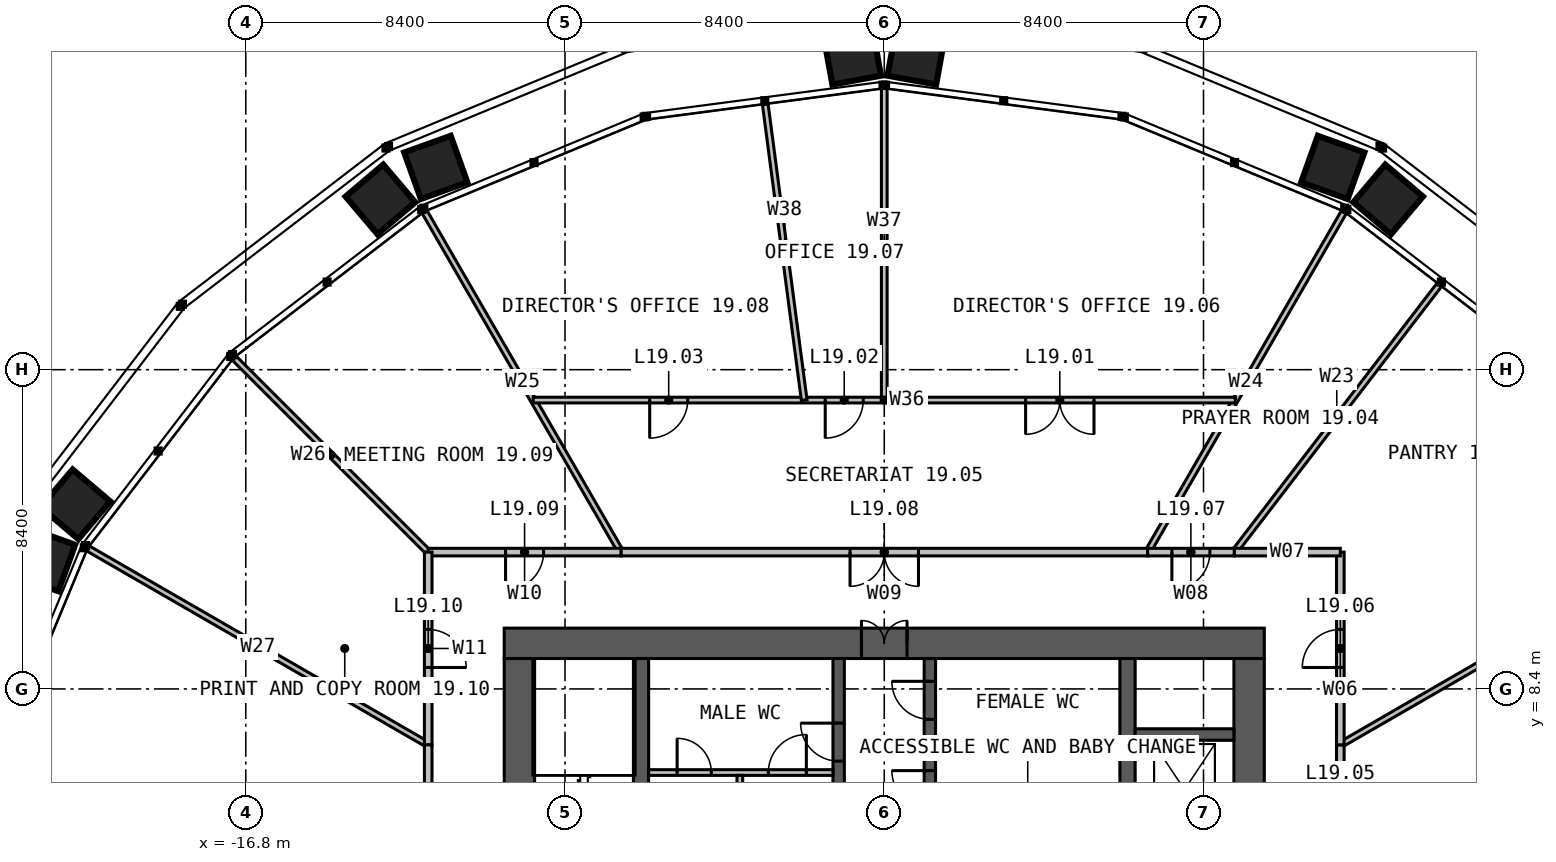
"""IFC4 building model, lengths in metres.
Left out: names, types, materials, properties, quantities, classifications, styles, units other than length and angle.
Written with IfcOpenShell. Run it as: python <this file> out.ifc"""

import sys

from ifc_helpers import new_model, si_unit, direction, frame, frame_2d, origin, place, context, subcontext, project, spatial, rectangle, extrude, element, fill, save


model = new_model("IFC4")
c1 = context("Model", 3, precision=1e-05, world=origin(), true_north=direction((0.0, 1.0)))
c2 = subcontext(c1, "Body", "Model", "MODEL_VIEW")
j1 = project(units=[si_unit("LENGTHUNIT", "METRE"), si_unit("PLANEANGLEUNIT", "RADIAN")], contexts=[c1])
p1 = place(None, origin())
s1 = spatial("IfcSite", under=j1, at=p1, CompositionType="ELEMENT")
p2 = place(p1, origin())
s2 = spatial("IfcBuilding", under=s1, at=p2, CompositionType="ELEMENT")
p3 = place(p2, frame((0.0, 0.0, 81.0)))
s3 = spatial("IfcBuildingStorey", under=s2, at=p3, CompositionType="ELEMENT", Elevation=81.0)
p4 = place(p3, frame((-10.0, 9.6, 0.0), z_axis=(0.0, 0.0, 1.0), x_axis=(1.0, 0.0, 0.0)))
e1 = element("IfcWall", 1, at=p4, inside=s3, PredefinedType="SOLIDWALL", context=c2, shape_type="SweptSolid", body=[
    extrude(rectangle(XDim=20.0, YDim=0.8, at=frame_2d((10.0, 0.0))), origin(), (0.0, 0.0, 1.0), 4.0),
])
p5 = place(p4, frame((9.4, 0.0, 0.0)))
e2 = element("IfcOpeningElement", 2, at=p5, cuts=e1, PredefinedType="OPENING", context=c2, shape_type="SweptSolid", body=[
    extrude(rectangle(XDim=1.2, YDim=2.2, at=frame_2d((0.6, 1.1))), frame((0.0, 0.41, 0.0), z_axis=(0.0, -1.0, 0.0), x_axis=(1.0, 0.0, 0.0)), (0.0, 0.0, 1.0), 0.82),
])
for number, where, z_axis, x_axis in (
    (3, (9.6, -9.2, 0.0), (0.0, 0.0, 1.0), (0.0, 1.0, 0.0)),
    (4, (-9.6, 9.2, 0.0), (0.0, 0.0, 1.0), (0.0, -1.0, 0.0)),
):
    element("IfcWall", number, at=place(p3, frame(where, z_axis=z_axis, x_axis=x_axis)), inside=s3, PredefinedType="SOLIDWALL", context=c2, shape_type="SweptSolid", body=[
        extrude(rectangle(XDim=18.4, YDim=0.8, at=frame_2d((9.2, 0.0))), origin(), (0.0, 0.0, 1.0), 4.0),
    ])
p6 = place(p3, frame((-6.4, -9.2, 0.0), z_axis=(0.0, 0.0, 1.0), x_axis=(0.0, 1.0, 0.0)))
e5 = element("IfcWall", 5, at=p6, inside=s3, PredefinedType="SOLIDWALL", context=c2, shape_type="SweptSolid", body=[
    extrude(rectangle(XDim=18.4, YDim=0.4, at=frame_2d((9.2, 0.0))), origin(), (0.0, 0.0, 1.0), 4.0),
])
p7 = place(p6, frame((8.7, 0.0, 0.0)))
e6 = element("IfcOpeningElement", 6, at=p7, cuts=e5, PredefinedType="OPENING", context=c2, shape_type="SweptSolid", body=[
    extrude(rectangle(XDim=1.0, YDim=2.2, at=frame_2d((0.5, 1.1))), frame((0.0, 0.21, 0.0), z_axis=(0.0, -1.0, 0.0), x_axis=(1.0, 0.0, 0.0)), (0.0, 0.0, 1.0), 0.42),
])
p8 = place(p3, frame((6.4, 9.2, 0.0), z_axis=(0.0, 0.0, 1.0), x_axis=(0.0, -1.0, 0.0)))
e7 = element("IfcWall", 7, at=p8, inside=s3, PredefinedType="SOLIDWALL", context=c2, shape_type="SweptSolid", body=[
    extrude(rectangle(XDim=18.4, YDim=0.4, at=frame_2d((9.2, 0.0))), origin(), (0.0, 0.0, 1.0), 4.0),
])
p9 = place(p8, frame((8.7, 0.0, 0.0)))
e8 = element("IfcOpeningElement", 8, at=p9, cuts=e7, PredefinedType="OPENING", context=c2, shape_type="SweptSolid", body=[
    extrude(rectangle(XDim=1.0, YDim=2.2, at=frame_2d((0.5, 1.1))), frame((0.0, 0.21, 0.0), z_axis=(0.0, -1.0, 0.0), x_axis=(1.0, 0.0, 0.0)), (0.0, 0.0, 1.0), 0.42),
])
p10 = place(p3, frame((-1.2, 1.45, 0.0), z_axis=(0.0, 0.0, 1.0), x_axis=(0.0, 1.0, 0.0)))
e9 = element("IfcWall", 9, at=p10, inside=s3, PredefinedType="SOLIDWALL", context=c2, shape_type="SweptSolid", body=[
    extrude(rectangle(XDim=7.75, YDim=0.3, at=frame_2d((3.875, 0.0))), origin(), (0.0, 0.0, 1.0), 4.0),
])
p11 = place(p10, frame((5.05, 0.0, 0.0)))
e10 = element("IfcOpeningElement", 10, at=p11, cuts=e9, PredefinedType="OPENING", context=c2, shape_type="SweptSolid", body=[
    extrude(rectangle(XDim=1.0, YDim=2.2, at=frame_2d((0.5, 1.1))), frame((0.0, 0.16, 0.0), z_axis=(0.0, -1.0, 0.0), x_axis=(1.0, 0.0, 0.0)), (0.0, 0.0, 1.0), 0.32),
])
p12 = place(p3, frame((1.2, 1.45, 0.0), z_axis=(0.0, 0.0, 1.0), x_axis=(0.0, 1.0, 0.0)))
e11 = element("IfcWall", 11, at=p12, inside=s3, PredefinedType="SOLIDWALL", context=c2, shape_type="SweptSolid", body=[
    extrude(rectangle(XDim=7.75, YDim=0.3, at=frame_2d((3.875, 0.0))), origin(), (0.0, 0.0, 1.0), 4.0),
])
p13 = place(p12, frame((3.8, 0.0, 0.0)))
e12 = element("IfcOpeningElement", 12, at=p13, cuts=e11, PredefinedType="OPENING", context=c2, shape_type="SweptSolid", body=[
    extrude(rectangle(XDim=1.0, YDim=2.2, at=frame_2d((0.5, 1.1))), frame((0.0, 0.16, 0.0), z_axis=(0.0, -1.0, 0.0), x_axis=(1.0, 0.0, 0.0)), (0.0, 0.0, 1.0), 0.32),
])
p14 = place(p12, frame((6.15, 0.0, 0.0)))
e13 = element("IfcOpeningElement", 13, at=p14, cuts=e11, PredefinedType="OPENING", context=c2, shape_type="SweptSolid", body=[
    extrude(rectangle(XDim=1.0, YDim=2.2, at=frame_2d((0.5, 1.1))), frame((0.0, 0.16, 0.0), z_axis=(0.0, -1.0, 0.0), x_axis=(1.0, 0.0, 0.0)), (0.0, 0.0, 1.0), 0.32),
])
p15 = place(p3, frame((6.6, 7.2, 0.0), z_axis=(0.0, 0.0, 1.0), x_axis=(1.0, 0.0, 0.0)))
e14 = element("IfcWall", 14, at=p15, inside=s3, PredefinedType="SOLIDWALL", context=c2, shape_type="SweptSolid", body=[
    extrude(rectangle(XDim=2.6, YDim=0.3, at=frame_2d((1.3, 0.0))), origin(), (0.0, 0.0, 1.0), 4.0),
])
p16 = place(p3, frame((1.35, 6.8, 0.0), z_axis=(0.0, 0.0, 1.0), x_axis=(1.0, 0.0, 0.0)))
e15 = element("IfcWall", 15, at=p16, inside=s3, PredefinedType="PARTITIONING", context=c2, shape_type="SweptSolid", body=[
    extrude(rectangle(XDim=4.85, YDim=0.15, at=frame_2d((2.425, 0.0))), origin(), (0.0, 0.0, 1.0), 3.75),
])
p17 = place(p3, frame((-6.2, 6.2, 0.0), z_axis=(0.0, 0.0, 1.0), x_axis=(1.0, 0.0, 0.0)))
e16 = element("IfcWall", 16, at=p17, inside=s3, PredefinedType="PARTITIONING", context=c2, shape_type="SweptSolid", body=[
    extrude(rectangle(XDim=4.85, YDim=0.15, at=frame_2d((2.425, 0.0))), origin(), (0.0, 0.0, 1.0), 3.75),
])
p18 = place(p17, frame((3.15, 0.0, 0.0)))
e17 = element("IfcOpeningElement", 17, at=p18, cuts=e16, PredefinedType="OPENING", context=c2, shape_type="SweptSolid", body=[
    extrude(rectangle(XDim=1.0, YDim=2.2, at=frame_2d((0.5, 1.1))), frame((0.0, 0.085, 0.0), z_axis=(0.0, -1.0, 0.0), x_axis=(1.0, 0.0, 0.0)), (0.0, 0.0, 1.0), 0.17),
])
p19 = place(p17, frame((0.75, 0.0, 0.0)))
e18 = element("IfcOpeningElement", 18, at=p19, cuts=e16, PredefinedType="OPENING", context=c2, shape_type="SweptSolid", body=[
    extrude(rectangle(XDim=0.9, YDim=2.2, at=frame_2d((0.45, 1.1))), frame((0.0, 0.085, 0.0), z_axis=(0.0, -1.0, 0.0), x_axis=(1.0, 0.0, 0.0)), (0.0, 0.0, 1.0), 0.17),
])
p20 = place(p3, frame((-3.8, 4.75, 0.0), z_axis=(0.0, 0.0, 1.0), x_axis=(0.0, 1.0, 0.0)))
e19 = element("IfcWall", 19, at=p20, inside=s3, PredefinedType="PARTITIONING", context=c2, shape_type="SweptSolid", body=[
    extrude(rectangle(XDim=1.375, YDim=0.15, at=frame_2d((0.688, 0.0))), origin(), (0.0, 0.0, 1.0), 3.75),
])
p21 = place(p3, frame((12.0, 3.215, 0.0), z_axis=(0.0, 0.0, 1.0), x_axis=(0.965925934223, 0.258818642288, 0.0)))
e20 = element("IfcWall", 20, at=p21, inside=s3, PredefinedType="PARTITIONING", context=c2, shape_type="SweptSolid", body=[
    extrude(rectangle(XDim=11.776, YDim=0.15, at=frame_2d((5.888, 0.0))), origin(), (0.0, 0.0, 1.0), 2.79),
])
p22 = place(p3, frame((12.0, 6.928, 0.0), z_axis=(0.0, 0.0, 1.0), x_axis=(0.866023632182, 0.500003068493, 0.0)))
e21 = element("IfcWall", 21, at=p22, inside=s3, PredefinedType="PARTITIONING", context=c2, shape_type="SweptSolid", body=[
    extrude(rectangle(XDim=10.343, YDim=0.15, at=frame_2d((5.171, 0.0))), origin(), (0.0, 0.0, 1.0), 2.79),
])
p23 = place(p3, frame((9.208, 12.0, 0.0), z_axis=(0.0, 0.0, 1.0), x_axis=(0.608757526406, 0.793356334848, 0.0)))
e22 = element("IfcWall", 22, at=p23, inside=s3, PredefinedType="PARTITIONING", context=c2, shape_type="SweptSolid", body=[
    extrude(rectangle(XDim=8.866, YDim=0.15, at=frame_2d((4.433, 0.0))), origin(), (0.0, 0.0, 1.0), 2.79),
])
for number, where, z_axis, x_axis in (
    (23, (6.928, 12.0, 0.0), (0.0, 0.0, 1.0), (0.5, 0.866, 0.0)),
    (24, (-6.928, 12.0, 0.0), (0.0, 0.0, 1.0), (-0.5, 0.866, 0.0)),
):
    element("IfcWall", number, at=place(p3, frame(where, z_axis=z_axis, x_axis=x_axis)), inside=s3, PredefinedType="PARTITIONING", context=c2, shape_type="SweptSolid", body=[
        extrude(rectangle(XDim=10.343, YDim=0.15, at=frame_2d((5.171, 0.0))), origin(), (0.0, 0.0, 1.0), 2.79),
    ])
p24 = place(p3, frame((-12.0, 12.0, 0.0), z_axis=(0.0, 0.0, 1.0), x_axis=(-0.707106781187, 0.707106781187, 0.0)))
e25 = element("IfcWall", 25, at=p24, inside=s3, PredefinedType="PARTITIONING", context=c2, shape_type="SweptSolid", body=[
    extrude(rectangle(XDim=7.229, YDim=0.15, at=frame_2d((3.614, 0.0))), origin(), (0.0, 0.0, 1.0), 2.79),
])
p25 = place(p3, frame((-12.0, 6.928, 0.0), z_axis=(0.0, 0.0, 1.0), x_axis=(-0.866023632182, 0.500003068493, 0.0)))
e26 = element("IfcWall", 26, at=p25, inside=s3, PredefinedType="PARTITIONING", context=c2, shape_type="SweptSolid", body=[
    extrude(rectangle(XDim=10.343, YDim=0.15, at=frame_2d((5.171, 0.0))), origin(), (0.0, 0.0, 1.0), 2.79),
])
p26 = place(p3, frame((12.0, 3.215, 0.0), z_axis=(0.0, 0.0, 1.0), x_axis=(0.0, 1.0, 0.0)))
e27 = element("IfcWall", 27, at=p26, inside=s3, PredefinedType="PARTITIONING", context=c2, shape_type="SweptSolid", body=[
    extrude(rectangle(XDim=3.713, YDim=0.2, at=frame_2d((1.856, 0.0))), origin(), (0.0, 0.0, 1.0), 3.8),
])
p27 = place(p26, frame((1.356, 0.0, 0.0)))
e28 = element("IfcOpeningElement", 28, at=p27, cuts=e27, PredefinedType="OPENING", context=c2, shape_type="SweptSolid", body=[
    extrude(rectangle(XDim=1.0, YDim=2.2, at=frame_2d((0.5, 1.1))), frame((0.0, 0.11, 0.0), z_axis=(0.0, -1.0, 0.0), x_axis=(1.0, 0.0, 0.0)), (0.0, 0.0, 1.0), 0.22),
])
p28 = place(p3, frame((12.0, 6.928, 0.0), z_axis=(0.0, 0.0, 1.0), x_axis=(0.0, 1.0, 0.0)))
e29 = element("IfcWall", 29, at=p28, inside=s3, PredefinedType="PARTITIONING", context=c2, shape_type="SweptSolid", body=[
    extrude(rectangle(XDim=5.072, YDim=0.2, at=frame_2d((2.536, 0.0))), origin(), (0.0, 0.0, 1.0), 3.8),
])
p29 = place(p28, frame((2.036, 0.0, 0.0)))
e30 = element("IfcOpeningElement", 30, at=p29, cuts=e29, PredefinedType="OPENING", context=c2, shape_type="SweptSolid", body=[
    extrude(rectangle(XDim=1.0, YDim=2.2, at=frame_2d((0.5, 1.1))), frame((0.0, 0.11, 0.0), z_axis=(0.0, -1.0, 0.0), x_axis=(1.0, 0.0, 0.0)), (0.0, 0.0, 1.0), 0.22),
])
p30 = place(p3, frame((12.0, 12.0, 0.0), z_axis=(0.0, 0.0, 1.0), x_axis=(-1.0, 0.0, 0.0)))
e31 = element("IfcWall", 31, at=p30, inside=s3, PredefinedType="PARTITIONING", context=c2, shape_type="SweptSolid", body=[
    extrude(rectangle(XDim=2.792, YDim=0.2, at=frame_2d((1.396, 0.0))), origin(), (0.0, 0.0, 1.0), 3.8),
])
p31 = place(p3, frame((9.208, 12.0, 0.0), z_axis=(0.0, 0.0, 1.0), x_axis=(-1.0, 0.0, 0.0)))
e32 = element("IfcWall", 32, at=p31, inside=s3, PredefinedType="PARTITIONING", context=c2, shape_type="SweptSolid", body=[
    extrude(rectangle(XDim=2.28, YDim=0.2, at=frame_2d((1.14, 0.0))), origin(), (0.0, 0.0, 1.0), 3.8),
])
p32 = place(p31, frame((0.64, 0.0, 0.0)))
e33 = element("IfcOpeningElement", 33, at=p32, cuts=e32, PredefinedType="OPENING", context=c2, shape_type="SweptSolid", body=[
    extrude(rectangle(XDim=1.0, YDim=2.2, at=frame_2d((0.5, 1.1))), frame((0.0, 0.11, 0.0), z_axis=(0.0, -1.0, 0.0), x_axis=(1.0, 0.0, 0.0)), (0.0, 0.0, 1.0), 0.22),
])
p33 = place(p3, frame((9.238, 16.0, 0.0), z_axis=(0.0, 0.0, 1.0), x_axis=(-1.0, 0.0, 0.0)))
e34 = element("IfcWall", 34, at=p33, inside=s3, PredefinedType="PARTITIONING", context=c2, shape_type="SweptSolid", body=[
    extrude(rectangle(XDim=18.475, YDim=0.15, at=frame_2d((9.238, 0.0))), origin(), (0.0, 0.0, 1.0), 2.79),
])
p34 = place(p33, frame((3.719, 0.0, 0.0)))
e35 = element("IfcOpeningElement", 35, at=p34, cuts=e34, PredefinedType="OPENING", context=c2, shape_type="SweptSolid", body=[
    extrude(rectangle(XDim=1.8, YDim=2.2, at=frame_2d((0.9, 1.1))), frame((0.0, 0.085, 0.0), z_axis=(0.0, -1.0, 0.0), x_axis=(1.0, 0.0, 0.0)), (0.0, 0.0, 1.0), 0.17),
])
p35 = place(p33, frame((9.791, 0.0, 0.0)))
e36 = element("IfcOpeningElement", 36, at=p35, cuts=e34, PredefinedType="OPENING", context=c2, shape_type="SweptSolid", body=[
    extrude(rectangle(XDim=1.0, YDim=2.2, at=frame_2d((0.5, 1.1))), frame((0.0, 0.085, 0.0), z_axis=(0.0, -1.0, 0.0), x_axis=(1.0, 0.0, 0.0)), (0.0, 0.0, 1.0), 0.17),
])
p36 = place(p33, frame((14.41, 0.0, 0.0)))
e37 = element("IfcOpeningElement", 37, at=p36, cuts=e34, PredefinedType="OPENING", context=c2, shape_type="SweptSolid", body=[
    extrude(rectangle(XDim=1.0, YDim=2.2, at=frame_2d((0.5, 1.1))), frame((0.0, 0.085, 0.0), z_axis=(0.0, -1.0, 0.0), x_axis=(1.0, 0.0, 0.0)), (0.0, 0.0, 1.0), 0.17),
])
p37 = place(p3, frame((0.0, 16.0, 0.0), z_axis=(0.0, 0.0, 1.0), x_axis=(0.0, 1.0, 0.0)))
e38 = element("IfcWall", 38, at=p37, inside=s3, PredefinedType="PARTITIONING", context=c2, shape_type="SweptSolid", body=[
    extrude(rectangle(XDim=8.199, YDim=0.15, at=frame_2d((4.1, 0.0))), origin(), (0.0, 0.0, 1.0), 2.79),
])
p38 = place(p3, frame((-2.106, 16.0, 0.0), z_axis=(0.0, 0.0, 1.0), x_axis=(-0.130524468592, 0.991445088292, 0.0)))
e39 = element("IfcWall", 39, at=p38, inside=s3, PredefinedType="PARTITIONING", context=c2, shape_type="SweptSolid", body=[
    extrude(rectangle(XDim=7.854, YDim=0.15, at=frame_2d((3.927, 0.0))), origin(), (0.0, 0.0, 1.0), 2.79),
])
p39 = place(p3, frame((6.928, 12.0, 0.0), z_axis=(0.0, 0.0, 1.0), x_axis=(-1.0, 0.0, 0.0)))
e40 = element("IfcWall", 40, at=p39, inside=s3, PredefinedType="PARTITIONING", context=c2, shape_type="SweptSolid", body=[
    extrude(rectangle(XDim=13.856, YDim=0.2, at=frame_2d((6.928, 0.0))), origin(), (0.0, 0.0, 1.0), 3.8),
])
p40 = place(p39, frame((6.028, 0.0, 0.0)))
e41 = element("IfcOpeningElement", 41, at=p40, cuts=e40, PredefinedType="OPENING", context=c2, shape_type="SweptSolid", body=[
    extrude(rectangle(XDim=1.8, YDim=2.2, at=frame_2d((0.9, 1.1))), frame((0.0, 0.11, 0.0), z_axis=(0.0, -1.0, 0.0), x_axis=(1.0, 0.0, 0.0)), (0.0, 0.0, 1.0), 0.22),
])
p41 = place(p3, frame((-6.928, 12.0, 0.0), z_axis=(0.0, 0.0, 1.0), x_axis=(-1.0, 0.0, 0.0)))
e42 = element("IfcWall", 42, at=p41, inside=s3, PredefinedType="PARTITIONING", context=c2, shape_type="SweptSolid", body=[
    extrude(rectangle(XDim=5.072, YDim=0.2, at=frame_2d((2.536, 0.0))), origin(), (0.0, 0.0, 1.0), 3.8),
])
p42 = place(p41, frame((2.036, 0.0, 0.0)))
e43 = element("IfcOpeningElement", 43, at=p42, cuts=e42, PredefinedType="OPENING", context=c2, shape_type="SweptSolid", body=[
    extrude(rectangle(XDim=1.0, YDim=2.2, at=frame_2d((0.5, 1.1))), frame((0.0, 0.11, 0.0), z_axis=(0.0, -1.0, 0.0), x_axis=(1.0, 0.0, 0.0)), (0.0, 0.0, 1.0), 0.22),
])
p43 = place(p3, frame((-12.0, 12.0, 0.0), z_axis=(0.0, 0.0, 1.0), x_axis=(0.0, -1.0, 0.0)))
e44 = element("IfcWall", 44, at=p43, inside=s3, PredefinedType="PARTITIONING", context=c2, shape_type="SweptSolid", body=[
    extrude(rectangle(XDim=5.072, YDim=0.2, at=frame_2d((2.536, 0.0))), origin(), (0.0, 0.0, 1.0), 3.8),
])
p44 = place(p43, frame((2.036, 0.0, 0.0)))
e45 = element("IfcOpeningElement", 45, at=p44, cuts=e44, PredefinedType="OPENING", context=c2, shape_type="SweptSolid", body=[
    extrude(rectangle(XDim=1.0, YDim=2.2, at=frame_2d((0.5, 1.1))), frame((0.0, 0.11, 0.0), z_axis=(0.0, -1.0, 0.0), x_axis=(1.0, 0.0, 0.0)), (0.0, 0.0, 1.0), 0.22),
])
p45 = place(p3, frame((-12.0, 6.928, 0.0), z_axis=(0.0, 0.0, 1.0), x_axis=(0.0, -1.0, 0.0)))
e46 = element("IfcWall", 46, at=p45, inside=s3, PredefinedType="PARTITIONING", context=c2, shape_type="SweptSolid", body=[
    extrude(rectangle(XDim=8.508, YDim=0.2, at=frame_2d((4.254, 0.0))), origin(), (0.0, 0.0, 1.0), 3.8),
])
p46 = place(p45, frame((3.354, 0.0, 0.0)))
e47 = element("IfcOpeningElement", 47, at=p46, cuts=e46, PredefinedType="OPENING", context=c2, shape_type="SweptSolid", body=[
    extrude(rectangle(XDim=1.8, YDim=2.2, at=frame_2d((0.9, 1.1))), frame((0.0, 0.11, 0.0), z_axis=(0.0, -1.0, 0.0), x_axis=(1.0, 0.0, 0.0)), (0.0, 0.0, 1.0), 0.22),
])
p47 = place(p5, origin())
e48 = element("IfcDoor", 48, at=p47, inside=s3, OperationType="DOUBLE_DOOR_SINGLE_SWING", PredefinedType="DOOR", context=c2, shape_type="SweptSolid", body=[
    extrude(rectangle(XDim=1.2, YDim=2.2, at=frame_2d((0.6, 1.1))), frame((0.0, 0.025, 0.0), z_axis=(0.0, -1.0, 0.0), x_axis=(1.0, 0.0, 0.0)), (0.0, 0.0, 1.0), 0.05),
])
fill(e2, e48)
p48 = place(p11, origin())
e49 = element("IfcDoor", 49, at=p48, inside=s3, OperationType="SINGLE_SWING_RIGHT", PredefinedType="DOOR", context=c2, shape_type="SweptSolid", body=[
    extrude(rectangle(XDim=1.0, YDim=2.2, at=frame_2d((0.5, 1.1))), frame((0.0, 0.025, 0.0), z_axis=(0.0, -1.0, 0.0), x_axis=(1.0, 0.0, 0.0)), (0.0, 0.0, 1.0), 0.05),
])
fill(e10, e49)
p49 = place(p13, origin())
e50 = element("IfcDoor", 50, at=p49, inside=s3, OperationType="SINGLE_SWING_RIGHT", PredefinedType="DOOR", context=c2, shape_type="SweptSolid", body=[
    extrude(rectangle(XDim=1.0, YDim=2.2, at=frame_2d((0.5, 1.1))), frame((0.0, 0.025, 0.0), z_axis=(0.0, -1.0, 0.0), x_axis=(1.0, 0.0, 0.0)), (0.0, 0.0, 1.0), 0.05),
])
fill(e12, e50)
p50 = place(p14, origin())
e51 = element("IfcDoor", 51, at=p50, inside=s3, OperationType="SINGLE_SWING_RIGHT", PredefinedType="DOOR", context=c2, shape_type="SweptSolid", body=[
    extrude(rectangle(XDim=1.0, YDim=2.2, at=frame_2d((0.5, 1.1))), frame((0.0, 0.025, 0.0), z_axis=(0.0, -1.0, 0.0), x_axis=(1.0, 0.0, 0.0)), (0.0, 0.0, 1.0), 0.05),
])
fill(e13, e51)
p51 = place(p18, origin())
e52 = element("IfcDoor", 52, at=p51, inside=s3, OperationType="SINGLE_SWING_RIGHT", PredefinedType="DOOR", context=c2, shape_type="SweptSolid", body=[
    extrude(rectangle(XDim=1.0, YDim=2.2, at=frame_2d((0.5, 1.1))), frame((0.0, 0.025, 0.0), z_axis=(0.0, -1.0, 0.0), x_axis=(1.0, 0.0, 0.0)), (0.0, 0.0, 1.0), 0.05),
])
fill(e17, e52)
p52 = place(p19, origin())
e53 = element("IfcDoor", 53, at=p52, inside=s3, OperationType="SINGLE_SWING_LEFT", PredefinedType="DOOR", context=c2, shape_type="SweptSolid", body=[
    extrude(rectangle(XDim=0.9, YDim=2.2, at=frame_2d((0.45, 1.1))), frame((0.0, 0.025, 0.0), z_axis=(0.0, -1.0, 0.0), x_axis=(1.0, 0.0, 0.0)), (0.0, 0.0, 1.0), 0.05),
])
fill(e18, e53)
p53 = place(p29, origin())
e54 = element("IfcDoor", 54, at=p53, inside=s3, OperationType="SINGLE_SWING_LEFT", PredefinedType="DOOR", context=c2, shape_type="SweptSolid", body=[
    extrude(rectangle(XDim=1.0, YDim=2.2, at=frame_2d((0.5, 1.1))), frame((0.0, 0.025, 0.0), z_axis=(0.0, -1.0, 0.0), x_axis=(1.0, 0.0, 0.0)), (0.0, 0.0, 1.0), 0.05),
])
fill(e30, e54)
p54 = place(p32, origin())
e55 = element("IfcDoor", 55, at=p54, inside=s3, OperationType="SINGLE_SWING_RIGHT", PredefinedType="DOOR", context=c2, shape_type="SweptSolid", body=[
    extrude(rectangle(XDim=1.0, YDim=2.2, at=frame_2d((0.5, 1.1))), frame((0.0, 0.025, 0.0), z_axis=(0.0, -1.0, 0.0), x_axis=(1.0, 0.0, 0.0)), (0.0, 0.0, 1.0), 0.05),
])
fill(e33, e55)
p55 = place(p34, origin())
e56 = element("IfcDoor", 56, at=p55, inside=s3, OperationType="DOUBLE_DOOR_SINGLE_SWING", PredefinedType="DOOR", context=c2, shape_type="SweptSolid", body=[
    extrude(rectangle(XDim=1.8, YDim=2.2, at=frame_2d((0.9, 1.1))), frame((0.0, 0.025, 0.0), z_axis=(0.0, -1.0, 0.0), x_axis=(1.0, 0.0, 0.0)), (0.0, 0.0, 1.0), 0.05),
])
fill(e35, e56)
p56 = place(p35, origin())
e57 = element("IfcDoor", 57, at=p56, inside=s3, OperationType="SINGLE_SWING_RIGHT", PredefinedType="DOOR", context=c2, shape_type="SweptSolid", body=[
    extrude(rectangle(XDim=1.0, YDim=2.2, at=frame_2d((0.5, 1.1))), frame((0.0, 0.025, 0.0), z_axis=(0.0, -1.0, 0.0), x_axis=(1.0, 0.0, 0.0)), (0.0, 0.0, 1.0), 0.05),
])
fill(e36, e57)
p57 = place(p36, origin())
e58 = element("IfcDoor", 58, at=p57, inside=s3, OperationType="SINGLE_SWING_RIGHT", PredefinedType="DOOR", context=c2, shape_type="SweptSolid", body=[
    extrude(rectangle(XDim=1.0, YDim=2.2, at=frame_2d((0.5, 1.1))), frame((0.0, 0.025, 0.0), z_axis=(0.0, -1.0, 0.0), x_axis=(1.0, 0.0, 0.0)), (0.0, 0.0, 1.0), 0.05),
])
fill(e37, e58)
p58 = place(p40, origin())
e59 = element("IfcDoor", 59, at=p58, inside=s3, OperationType="DOUBLE_DOOR_SINGLE_SWING", PredefinedType="DOOR", context=c2, shape_type="SweptSolid", body=[
    extrude(rectangle(XDim=1.8, YDim=2.2, at=frame_2d((0.9, 1.1))), frame((0.0, 0.025, 0.0), z_axis=(0.0, -1.0, 0.0), x_axis=(1.0, 0.0, 0.0)), (0.0, 0.0, 1.0), 0.05),
])
fill(e41, e59)
p59 = place(p42, origin())
e60 = element("IfcDoor", 60, at=p59, inside=s3, OperationType="SINGLE_SWING_RIGHT", PredefinedType="DOOR", context=c2, shape_type="SweptSolid", body=[
    extrude(rectangle(XDim=1.0, YDim=2.2, at=frame_2d((0.5, 1.1))), frame((0.0, 0.025, 0.0), z_axis=(0.0, -1.0, 0.0), x_axis=(1.0, 0.0, 0.0)), (0.0, 0.0, 1.0), 0.05),
])
fill(e43, e60)
p60 = place(p44, origin())
e61 = element("IfcDoor", 61, at=p60, inside=s3, OperationType="SINGLE_SWING_RIGHT", PredefinedType="DOOR", context=c2, shape_type="SweptSolid", body=[
    extrude(rectangle(XDim=1.0, YDim=2.2, at=frame_2d((0.5, 1.1))), frame((0.0, 0.025, 0.0), z_axis=(0.0, -1.0, 0.0), x_axis=(1.0, 0.0, 0.0)), (0.0, 0.0, 1.0), 0.05),
])
fill(e45, e61)
save(model, sys.argv[1])
